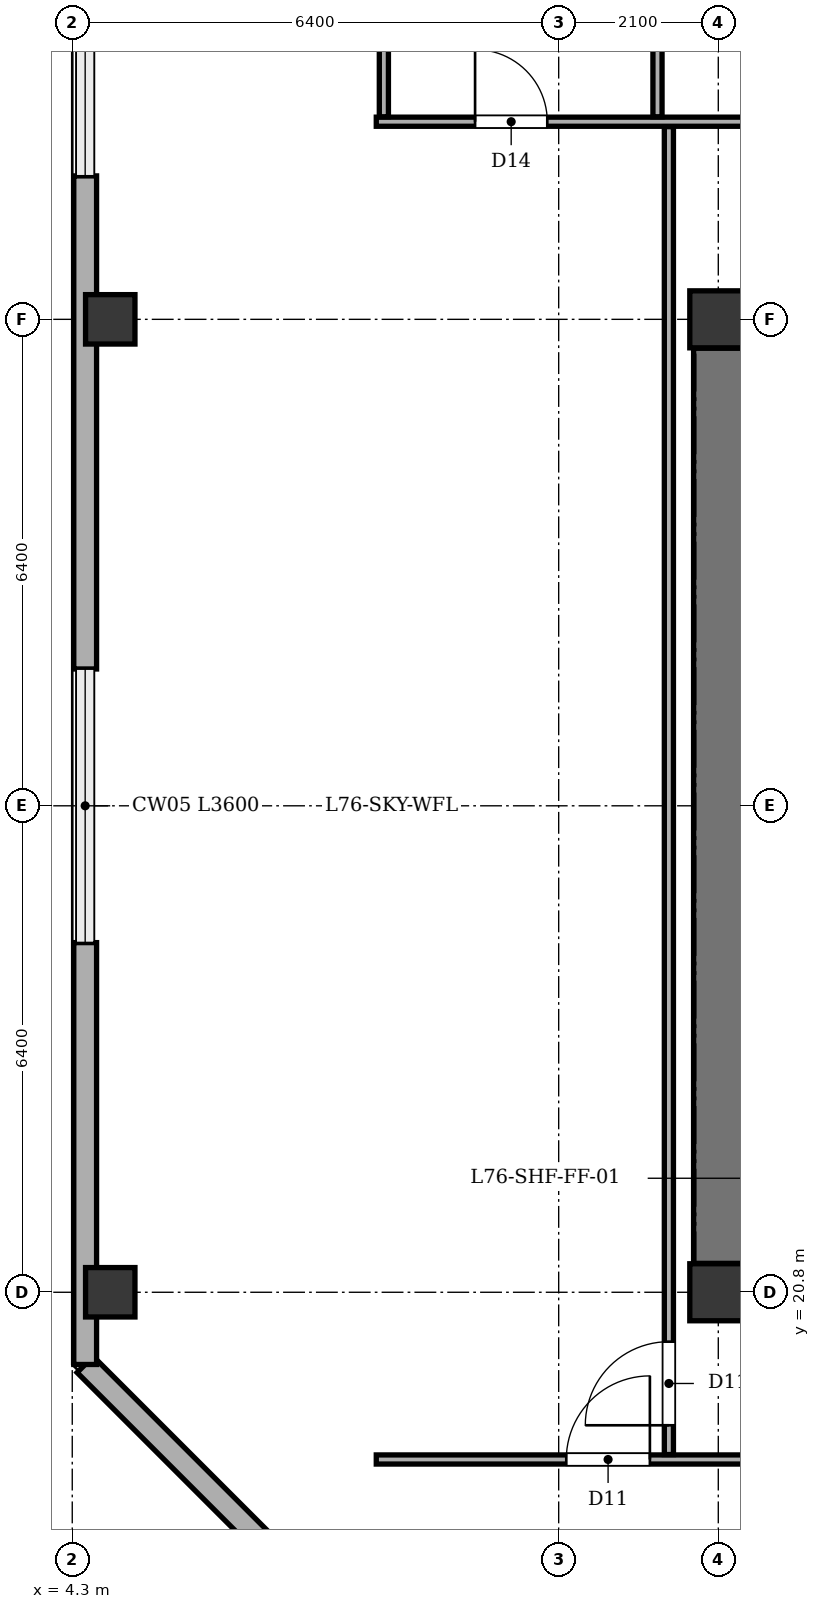
"""IFC4 building model, lengths in metres.
Left out: names, types, materials, properties, quantities, classifications, styles, units other than length and angle.
Written with IfcOpenShell. Run it as: python <this file> out.ifc"""

import sys

from ifc_helpers import new_model, si_unit, direction, frame, frame_2d, origin, origin_2d, place, context, subcontext, project, spatial, rectangle, extrude, element, fill, save


model = new_model("IFC4")
c1 = context("Model", 3, precision=1e-05, world=origin(), true_north=direction((0.0, 1.0)))
c2 = subcontext(c1, "Body", "Model", "MODEL_VIEW")
j1 = project(units=[si_unit("LENGTHUNIT", "METRE"), si_unit("PLANEANGLEUNIT", "RADIAN")], contexts=[c1])
p1 = place(None, origin())
s1 = spatial("IfcSite", under=j1, at=p1, CompositionType="ELEMENT")
p2 = place(p1, origin())
s2 = spatial("IfcBuilding", under=s1, at=p2, CompositionType="ELEMENT")
p3 = place(p2, frame((0.0, 0.0, 287.4)))
s3 = spatial("IfcBuildingStorey", under=s2, at=p3, CompositionType="ELEMENT", Elevation=287.4)
for number, where, z_axis, x_axis in (
    (1, (12.8, 20.8, 0.0), (0.0, 0.0, 1.0), (1.0, 0.0, 0.0)),
    (2, (12.8, 33.6, 0.0), (0.0, 0.0, 1.0), (1.0, 0.0, 0.0)),
):
    element("IfcColumn", number, at=place(p3, frame(where, z_axis=z_axis, x_axis=x_axis)), inside=s3, PredefinedType="COLUMN", context=c2, shape_type="SweptSolid", body=[
        extrude(rectangle(XDim=0.75, YDim=0.75, at=origin_2d()), origin(), (0.0, 0.0, 1.0), 4.8),
    ])
for number, where, z_axis, x_axis in (
    (3, (4.8, 20.8, 0.0), (0.0, 0.0, 1.0), (1.0, 0.0, 0.0)),
    (4, (4.8, 33.6, 0.0), (0.0, 0.0, 1.0), (1.0, 0.0, 0.0)),
):
    element("IfcColumn", number, at=place(p3, frame(where, z_axis=z_axis, x_axis=x_axis)), inside=s3, PredefinedType="COLUMN", context=c2, shape_type="SweptSolid", body=[
        extrude(rectangle(XDim=0.65, YDim=0.65, at=origin_2d()), origin(), (0.0, 0.0, 1.0), 4.8),
    ])
p4 = place(p3, frame((8.3, 16.02, 0.0), z_axis=(0.0, 0.0, 1.0), x_axis=(-0.707106781187, 0.707106781187, 0.0)))
e5 = element("IfcWall", 5, at=p4, inside=s3, PredefinedType="STANDARD", context=c2, shape_type="SweptSolid", body=[
    extrude(rectangle(XDim=5.417, YDim=0.3, at=frame_2d((2.708, 0.0))), origin(), (0.0, 0.0, 1.0), 3.735),
])
p5 = place(p3, frame((4.47, 19.85, 0.0), z_axis=(0.0, 0.0, 1.0), x_axis=(0.0, 1.0, 0.0)))
e6 = element("IfcWall", 6, at=p5, inside=s3, PredefinedType="STANDARD", context=c2, shape_type="SweptSolid", body=[
    extrude(rectangle(XDim=5.55, YDim=0.3, at=frame_2d((2.775, 0.0))), origin(), (0.0, 0.0, 1.0), 3.735),
])
p6 = place(p3, frame((4.47, 29.0, 0.0), z_axis=(0.0, 0.0, 1.0), x_axis=(0.0, 1.0, 0.0)))
e7 = element("IfcWall", 7, at=p6, inside=s3, PredefinedType="STANDARD", context=c2, shape_type="SweptSolid", body=[
    extrude(rectangle(XDim=6.487, YDim=0.3, at=frame_2d((3.244, 0.0))), origin(), (0.0, 0.0, 1.0), 3.735),
])
p7 = place(p3, frame((12.8, 21.18, 0.0), z_axis=(0.0, 0.0, 1.0), x_axis=(0.0, 1.0, 0.0)))
e8 = element("IfcWall", 8, at=p7, inside=s3, PredefinedType="SHEAR", context=c2, shape_type="SweptSolid", body=[
    extrude(rectangle(XDim=12.04, YDim=0.65, at=frame_2d((6.02, 0.0))), origin(), (0.0, 0.0, 1.0), 4.35),
])
p8 = place(p3, frame((8.3, 18.6, 0.0), z_axis=(0.0, 0.0, 1.0), x_axis=(1.0, 0.0, 0.0)))
e9 = element("IfcWall", 9, at=p8, inside=s3, PredefinedType="PARTITIONING", context=c2, shape_type="SweptSolid", body=[
    extrude(rectangle(XDim=37.0, YDim=0.12, at=frame_2d((18.5, 0.0))), origin(), (0.0, 0.0, 1.0), 4.35),
])
p9 = place(p8, frame((2.5, 0.0, 0.0)))
e10 = element("IfcOpeningElement", 10, at=p9, cuts=e9, PredefinedType="OPENING", context=c2, shape_type="SweptSolid", body=[
    extrude(rectangle(XDim=1.1, YDim=2.15, at=frame_2d((0.55, 1.075))), frame((0.0, 0.07, 0.0), z_axis=(0.0, -1.0, 0.0), x_axis=(1.0, 0.0, 0.0)), (0.0, 0.0, 1.0), 0.14),
])
p10 = place(p8, frame((15.08, 0.0, 0.0)))
e11 = element("IfcOpeningElement", 11, at=p10, cuts=e9, PredefinedType="OPENING", context=c2, shape_type="SweptSolid", body=[
    extrude(rectangle(XDim=1.1, YDim=2.15, at=frame_2d((0.55, 1.075))), frame((0.0, 0.07, 0.0), z_axis=(0.0, -1.0, 0.0), x_axis=(1.0, 0.0, 0.0)), (0.0, 0.0, 1.0), 0.14),
])
p11 = place(p8, frame((27.66, 0.0, 0.0)))
e12 = element("IfcOpeningElement", 12, at=p11, cuts=e9, PredefinedType="OPENING", context=c2, shape_type="SweptSolid", body=[
    extrude(rectangle(XDim=1.1, YDim=2.15, at=frame_2d((0.55, 1.075))), frame((0.0, 0.07, 0.0), z_axis=(0.0, -1.0, 0.0), x_axis=(1.0, 0.0, 0.0)), (0.0, 0.0, 1.0), 0.14),
])
p12 = place(p3, frame((8.3, 36.2, 0.0), z_axis=(0.0, 0.0, 1.0), x_axis=(1.0, 0.0, 0.0)))
e13 = element("IfcWall", 13, at=p12, inside=s3, PredefinedType="PARTITIONING", context=c2, shape_type="SweptSolid", body=[
    extrude(rectangle(XDim=37.0, YDim=0.12, at=frame_2d((18.5, 0.0))), origin(), (0.0, 0.0, 1.0), 4.35),
])
p13 = place(p12, frame((1.3, 0.0, 0.0)))
e14 = element("IfcOpeningElement", 14, at=p13, cuts=e13, PredefinedType="OPENING", context=c2, shape_type="SweptSolid", body=[
    extrude(rectangle(XDim=0.95, YDim=2.1, at=frame_2d((0.475, 1.05))), frame((0.0, 0.07, 0.0), z_axis=(0.0, -1.0, 0.0), x_axis=(1.0, 0.0, 0.0)), (0.0, 0.0, 1.0), 0.14),
])
p14 = place(p12, frame((4.9, 0.0, 0.0)))
e15 = element("IfcOpeningElement", 15, at=p14, cuts=e13, PredefinedType="OPENING", context=c2, shape_type="SweptSolid", body=[
    extrude(rectangle(XDim=0.95, YDim=2.1, at=frame_2d((0.475, 1.05))), frame((0.0, 0.07, 0.0), z_axis=(0.0, -1.0, 0.0), x_axis=(1.0, 0.0, 0.0)), (0.0, 0.0, 1.0), 0.14),
])
p15 = place(p12, frame((8.3, 0.0, 0.0)))
e16 = element("IfcOpeningElement", 16, at=p15, cuts=e13, PredefinedType="OPENING", context=c2, shape_type="SweptSolid", body=[
    extrude(rectangle(XDim=1.0, YDim=2.1, at=frame_2d((0.5, 1.05))), frame((0.0, 0.07, 0.0), z_axis=(0.0, -1.0, 0.0), x_axis=(1.0, 0.0, 0.0)), (0.0, 0.0, 1.0), 0.14),
])
p16 = place(p12, frame((13.5, 0.0, 0.0)))
e17 = element("IfcOpeningElement", 17, at=p16, cuts=e13, PredefinedType="OPENING", context=c2, shape_type="SweptSolid", body=[
    extrude(rectangle(XDim=1.5, YDim=2.15, at=frame_2d((0.75, 1.075))), frame((0.0, 0.07, 0.0), z_axis=(0.0, -1.0, 0.0), x_axis=(1.0, 0.0, 0.0)), (0.0, 0.0, 1.0), 0.14),
])
for number, where, z_axis, x_axis in (
    (18, (8.4, 36.265, 0.0), (0.0, 0.0, 1.0), (0.0, 1.0, 0.0)),
    (19, (12.0, 36.265, 0.0), (0.0, 0.0, 1.0), (0.0, 1.0, 0.0)),
):
    element("IfcWall", number, at=place(p3, frame(where, z_axis=z_axis, x_axis=x_axis)), inside=s3, PredefinedType="PARTITIONING", context=c2, shape_type="SweptSolid", body=[
        extrude(rectangle(XDim=8.51, YDim=0.12, at=frame_2d((4.255, 0.0))), origin(), (0.0, 0.0, 1.0), 4.35),
    ])
p17 = place(p3, frame((12.15, 18.665, 0.0), z_axis=(0.0, 0.0, 1.0), x_axis=(0.0, 1.0, 0.0)))
e20 = element("IfcWall", 20, at=p17, inside=s3, PredefinedType="PARTITIONING", context=c2, shape_type="SweptSolid", body=[
    extrude(rectangle(XDim=17.47, YDim=0.12, at=frame_2d((8.735, 0.0))), origin(), (0.0, 0.0, 1.0), 4.35),
])
p18 = place(p17, frame((0.385, 0.0, 0.0)))
e21 = element("IfcOpeningElement", 21, at=p18, cuts=e20, PredefinedType="OPENING", context=c2, shape_type="SweptSolid", body=[
    extrude(rectangle(XDim=1.1, YDim=2.15, at=frame_2d((0.55, 1.075))), frame((0.0, 0.07, 0.0), z_axis=(0.0, -1.0, 0.0), x_axis=(1.0, 0.0, 0.0)), (0.0, 0.0, 1.0), 0.14),
])
p19 = place(p9, origin())
e22 = element("IfcDoor", 22, at=p19, inside=s3, OperationType="SINGLE_SWING_RIGHT", PredefinedType="DOOR", context=c2, shape_type="SweptSolid", body=[
    extrude(rectangle(XDim=1.1, YDim=2.15, at=frame_2d((0.55, 1.075))), frame((0.0, 0.025, 0.0), z_axis=(0.0, -1.0, 0.0), x_axis=(1.0, 0.0, 0.0)), (0.0, 0.0, 1.0), 0.05),
])
fill(e10, e22)
p20 = place(p13, origin())
e23 = element("IfcDoor", 23, at=p20, inside=s3, OperationType="SINGLE_SWING_LEFT", PredefinedType="DOOR", context=c2, shape_type="SweptSolid", body=[
    extrude(rectangle(XDim=0.95, YDim=2.1, at=frame_2d((0.475, 1.05))), frame((0.0, 0.025, 0.0), z_axis=(0.0, -1.0, 0.0), x_axis=(1.0, 0.0, 0.0)), (0.0, 0.0, 1.0), 0.05),
])
fill(e14, e23)
p21 = place(p18, origin())
e24 = element("IfcDoor", 24, at=p21, inside=s3, OperationType="SINGLE_SWING_LEFT", PredefinedType="DOOR", context=c2, shape_type="SweptSolid", body=[
    extrude(rectangle(XDim=1.1, YDim=2.15, at=frame_2d((0.55, 1.075))), frame((0.0, 0.025, 0.0), z_axis=(0.0, -1.0, 0.0), x_axis=(1.0, 0.0, 0.0)), (0.0, 0.0, 1.0), 0.05),
])
fill(e21, e24)
save(model, sys.argv[1])
